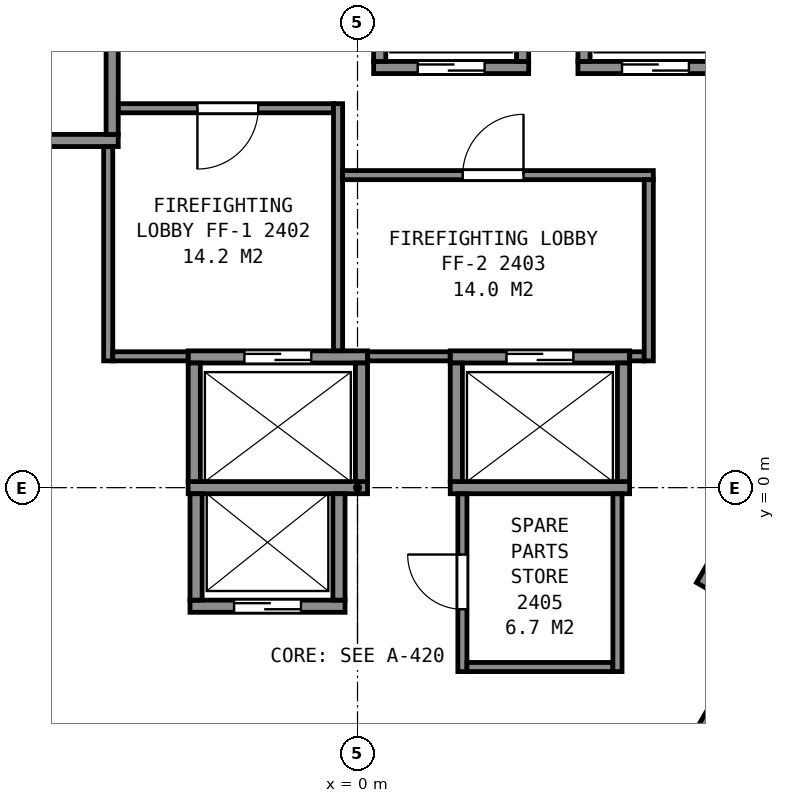
"""IFC4 building model, lengths in metres.
Left out: names, types, materials, properties, quantities, classifications, styles, units other than length and angle.
Written with IfcOpenShell. Run it as: python <this file> out.ifc"""

import sys

from ifc_helpers import new_model, si_unit, direction, frame, frame_2d, origin, place, context, subcontext, project, spatial, rectangle, extrude, element, fill, save


model = new_model("IFC4")
c1 = context("Model", 3, precision=1e-05, world=origin(), true_north=direction((0.0, 1.0)))
c2 = subcontext(c1, "Body", "Model", "MODEL_VIEW")
j1 = project(units=[si_unit("LENGTHUNIT", "METRE"), si_unit("PLANEANGLEUNIT", "RADIAN")], contexts=[c1])
p1 = place(None, origin())
s1 = spatial("IfcSite", under=j1, at=p1, CompositionType="ELEMENT")
p2 = place(p1, origin())
s2 = spatial("IfcBuilding", under=s1, at=p2, CompositionType="ELEMENT")
p3 = place(p2, frame((0.0, 0.0, 103.6)))
s3 = spatial("IfcBuildingStorey", under=s2, at=p3, CompositionType="ELEMENT", Elevation=103.6)
p4 = place(p3, frame((-2.755, -1.95, 0.0), z_axis=(0.0, 0.0, 1.0), x_axis=(1.0, 0.0, 0.0)))
e1 = element("IfcWall", 1, at=p4, inside=s3, PredefinedType="PARTITIONING", context=c2, shape_type="SweptSolid", body=[
    extrude(rectangle(XDim=2.55, YDim=0.2, at=frame_2d((1.275, 0.0))), origin(), (0.0, 0.0, 1.0), 3.6),
])
p5 = place(p4, frame((0.725, 0.0, 0.0)))
e2 = element("IfcOpeningElement", 2, at=p5, cuts=e1, PredefinedType="OPENING", context=c2, shape_type="SweptSolid", body=[
    extrude(rectangle(XDim=1.1, YDim=2.1, at=frame_2d((0.55, 1.05))), frame((0.0, 0.11, 0.0), z_axis=(0.0, -1.0, 0.0), x_axis=(1.0, 0.0, 0.0)), (0.0, 0.0, 1.0), 0.22),
])
p6 = place(p3, frame((-2.785, 0.0, 0.0), z_axis=(0.0, 0.0, 1.0), x_axis=(1.0, 0.0, 0.0)))
e3 = element("IfcWall", 3, at=p6, inside=s3, PredefinedType="PARTITIONING", context=c2, shape_type="SweptSolid", body=[
    extrude(rectangle(XDim=2.95, YDim=0.2, at=frame_2d((1.475, 0.0))), origin(), (0.0, 0.0, 1.0), 3.6),
])
p7 = place(p3, frame((1.525, 0.0, 0.0), z_axis=(0.0, 0.0, 1.0), x_axis=(1.0, 0.0, 0.0)))
e4 = element("IfcWall", 4, at=p7, inside=s3, PredefinedType="PARTITIONING", context=c2, shape_type="SweptSolid", body=[
    extrude(rectangle(XDim=2.95, YDim=0.2, at=frame_2d((1.475, 0.0))), origin(), (0.0, 0.0, 1.0), 3.6),
])
p8 = place(p3, frame((-2.785, 2.15, 0.0), z_axis=(0.0, 0.0, 1.0), x_axis=(1.0, 0.0, 0.0)))
e5 = element("IfcWall", 5, at=p8, inside=s3, PredefinedType="PARTITIONING", context=c2, shape_type="SweptSolid", body=[
    extrude(rectangle(XDim=2.95, YDim=0.2, at=frame_2d((1.475, 0.0))), origin(), (0.0, 0.0, 1.0), 3.6),
])
p9 = place(p8, frame((0.925, 0.0, 0.0)))
e6 = element("IfcOpeningElement", 6, at=p9, cuts=e5, PredefinedType="OPENING", context=c2, shape_type="SweptSolid", body=[
    extrude(rectangle(XDim=1.1, YDim=2.1, at=frame_2d((0.55, 1.05))), frame((0.0, 0.11, 0.0), z_axis=(0.0, -1.0, 0.0), x_axis=(1.0, 0.0, 0.0)), (0.0, 0.0, 1.0), 0.22),
])
p10 = place(p3, frame((1.525, 2.15, 0.0), z_axis=(0.0, 0.0, 1.0), x_axis=(1.0, 0.0, 0.0)))
e7 = element("IfcWall", 7, at=p10, inside=s3, PredefinedType="PARTITIONING", context=c2, shape_type="SweptSolid", body=[
    extrude(rectangle(XDim=2.95, YDim=0.2, at=frame_2d((1.475, 0.0))), origin(), (0.0, 0.0, 1.0), 3.6),
])
p11 = place(p10, frame((0.925, 0.0, 0.0)))
e8 = element("IfcOpeningElement", 8, at=p11, cuts=e7, PredefinedType="OPENING", context=c2, shape_type="SweptSolid", body=[
    extrude(rectangle(XDim=1.1, YDim=2.1, at=frame_2d((0.55, 1.05))), frame((0.0, 0.11, 0.0), z_axis=(0.0, -1.0, 0.0), x_axis=(1.0, 0.0, 0.0)), (0.0, 0.0, 1.0), 0.22),
])
p12 = place(p3, frame((-6.285, 5.71, 0.0), z_axis=(0.0, 0.0, 1.0), x_axis=(1.0, 0.0, 0.0)))
e9 = element("IfcWall", 9, at=p12, inside=s3, PredefinedType="PARTITIONING", context=c2, shape_type="SweptSolid", body=[
    extrude(rectangle(XDim=2.35, YDim=0.2, at=frame_2d((1.175, 0.0))), origin(), (0.0, 0.0, 1.0), 3.6),
])
p13 = place(p3, frame((0.265, 6.91, 0.0), z_axis=(0.0, 0.0, 1.0), x_axis=(1.0, 0.0, 0.0)))
e10 = element("IfcWall", 10, at=p13, inside=s3, PredefinedType="PARTITIONING", context=c2, shape_type="SweptSolid", body=[
    extrude(rectangle(XDim=2.55, YDim=0.2, at=frame_2d((1.275, 0.0))), origin(), (0.0, 0.0, 1.0), 3.6),
])
p14 = place(p13, frame((0.725, 0.0, 0.0)))
e11 = element("IfcOpeningElement", 11, at=p14, cuts=e10, PredefinedType="OPENING", context=c2, shape_type="SweptSolid", body=[
    extrude(rectangle(XDim=1.1, YDim=2.1, at=frame_2d((0.55, 1.05))), frame((0.0, 0.11, 0.0), z_axis=(0.0, -1.0, 0.0), x_axis=(1.0, 0.0, 0.0)), (0.0, 0.0, 1.0), 0.22),
])
p15 = place(p3, frame((3.625, 6.91, 0.0), z_axis=(0.0, 0.0, 1.0), x_axis=(1.0, 0.0, 0.0)))
e12 = element("IfcWall", 12, at=p15, inside=s3, PredefinedType="PARTITIONING", context=c2, shape_type="SweptSolid", body=[
    extrude(rectangle(XDim=2.55, YDim=0.2, at=frame_2d((1.275, 0.0))), origin(), (0.0, 0.0, 1.0), 3.6),
])
p16 = place(p15, frame((0.725, 0.0, 0.0)))
e13 = element("IfcOpeningElement", 13, at=p16, cuts=e12, PredefinedType="OPENING", context=c2, shape_type="SweptSolid", body=[
    extrude(rectangle(XDim=1.1, YDim=2.1, at=frame_2d((0.55, 1.05))), frame((0.0, 0.11, 0.0), z_axis=(0.0, -1.0, 0.0), x_axis=(1.0, 0.0, 0.0)), (0.0, 0.0, 1.0), 0.22),
])
p17 = place(p3, frame((5.527, -4.247, 0.0), z_axis=(0.0, 0.0, 1.0), x_axis=(0.499938297808, 0.866061024631, 0.0)))
e14 = element("IfcWall", 14, at=p17, inside=s3, PredefinedType="PARTITIONING", context=c2, shape_type="SweptSolid", body=[
    extrude(rectangle(XDim=2.35, YDim=0.2, at=frame_2d((1.175, 0.0))), origin(), (0.0, 0.0, 1.0), 3.6),
])
p18 = place(p17, frame((0.725, 0.0, 0.0)))
e15 = element("IfcOpeningElement", 15, at=p18, cuts=e14, PredefinedType="OPENING", context=c2, shape_type="SweptSolid", body=[
    extrude(rectangle(XDim=1.1, YDim=2.1, at=frame_2d((0.55, 1.05))), frame((0.0, 0.11, 0.0), z_axis=(0.0, -1.0, 0.0), x_axis=(1.0, 0.0, 0.0)), (0.0, 0.0, 1.0), 0.22),
])
p19 = place(p3, frame((5.663, -1.612, 0.0), z_axis=(0.0, 0.0, 1.0), x_axis=(0.49998122708, 0.866036242063, 0.0)))
e16 = element("IfcWall", 16, at=p19, inside=s3, PredefinedType="PARTITIONING", context=c2, shape_type="SweptSolid", body=[
    extrude(rectangle(XDim=4.9, YDim=0.2, at=frame_2d((2.45, 0.0))), origin(), (0.0, 0.0, 1.0), 3.6),
])
p20 = place(p3, frame((4.375, 0.1, 0.0), z_axis=(0.0, 0.0, 1.0), x_axis=(0.0, 1.0, 0.0)))
e17 = element("IfcWall", 17, at=p20, inside=s3, PredefinedType="PARTITIONING", context=c2, shape_type="SweptSolid", body=[
    extrude(rectangle(XDim=1.95, YDim=0.2, at=frame_2d((0.975, 0.0))), origin(), (0.0, 0.0, 1.0), 3.6),
])
for number, where, z_axis, x_axis in (
    (18, (3.725, 7.01, 0.0), (0.0, 0.0, 1.0), (0.0, 1.0, 0.0)),
    (19, (2.715, 7.01, 0.0), (0.0, 0.0, 1.0), (0.0, 1.0, 0.0)),
):
    element("IfcWall", number, at=place(p3, frame(where, z_axis=z_axis, x_axis=x_axis)), inside=s3, PredefinedType="PARTITIONING", context=c2, shape_type="SweptSolid", body=[
        extrude(rectangle(XDim=1.75, YDim=0.2, at=frame_2d((0.875, 0.0))), origin(), (0.0, 0.0, 1.0), 3.6),
    ])
p21 = place(p3, frame((1.625, 0.1, 0.0), z_axis=(0.0, 0.0, 1.0), x_axis=(0.0, 1.0, 0.0)))
e20 = element("IfcWall", 20, at=p21, inside=s3, PredefinedType="PARTITIONING", context=c2, shape_type="SweptSolid", body=[
    extrude(rectangle(XDim=1.95, YDim=0.2, at=frame_2d((0.975, 0.0))), origin(), (0.0, 0.0, 1.0), 3.6),
])
p22 = place(p3, frame((0.365, 7.01, 0.0), z_axis=(0.0, 0.0, 1.0), x_axis=(0.0, 1.0, 0.0)))
e21 = element("IfcWall", 21, at=p22, inside=s3, PredefinedType="PARTITIONING", context=c2, shape_type="SweptSolid", body=[
    extrude(rectangle(XDim=1.75, YDim=0.2, at=frame_2d((0.875, 0.0))), origin(), (0.0, 0.0, 1.0), 3.6),
])
p23 = place(p3, frame((0.065, 0.1, 0.0), z_axis=(0.0, 0.0, 1.0), x_axis=(0.0, 1.0, 0.0)))
e22 = element("IfcWall", 22, at=p23, inside=s3, PredefinedType="PARTITIONING", context=c2, shape_type="SweptSolid", body=[
    extrude(rectangle(XDim=1.95, YDim=0.2, at=frame_2d((0.975, 0.0))), origin(), (0.0, 0.0, 1.0), 3.6),
])
for number, where, z_axis, x_axis in (
    (23, (-0.305, -1.85, 0.0), (0.0, 0.0, 1.0), (0.0, 1.0, 0.0)),
    (24, (-2.655, -1.85, 0.0), (0.0, 0.0, 1.0), (0.0, 1.0, 0.0)),
):
    element("IfcWall", number, at=place(p3, frame(where, z_axis=z_axis, x_axis=x_axis)), inside=s3, PredefinedType="PARTITIONING", context=c2, shape_type="SweptSolid", body=[
        extrude(rectangle(XDim=1.75, YDim=0.2, at=frame_2d((0.875, 0.0))), origin(), (0.0, 0.0, 1.0), 3.6),
    ])
p24 = place(p3, frame((-2.685, 0.1, 0.0), z_axis=(0.0, 0.0, 1.0), x_axis=(0.0, 1.0, 0.0)))
e25 = element("IfcWall", 25, at=p24, inside=s3, PredefinedType="PARTITIONING", context=c2, shape_type="SweptSolid", body=[
    extrude(rectangle(XDim=1.95, YDim=0.2, at=frame_2d((0.975, 0.0))), origin(), (0.0, 0.0, 1.0), 3.6),
])
p25 = place(p3, frame((-4.035, 5.81, 0.0), z_axis=(0.0, 0.0, 1.0), x_axis=(0.0, 1.0, 0.0)))
e26 = element("IfcWall", 26, at=p25, inside=s3, PredefinedType="PARTITIONING", context=c2, shape_type="SweptSolid", body=[
    extrude(rectangle(XDim=1.75, YDim=0.2, at=frame_2d((0.875, 0.0))), origin(), (0.0, 0.0, 1.0), 3.6),
])
p26 = place(p3, frame((-13.664, 5.946, 0.0), z_axis=(0.0, 0.0, 1.0), x_axis=(0.499994327219, -0.866028678941, 0.0)))
e27 = element("IfcWall", 27, at=p26, inside=s3, PredefinedType="PARTITIONING", context=c2, shape_type="SweptSolid", body=[
    extrude(rectangle(XDim=23.968, YDim=0.2, at=frame_2d((11.984, 0.0))), origin(), (0.0, 0.0, 1.0), 3.35),
])
p27 = place(p3, frame((-4.152, -5.729, 0.0), z_axis=(0.0, 0.0, 1.0), x_axis=(-0.500024287448, 0.866011380966, 0.0)))
e28 = element("IfcWall", 28, at=p27, inside=s3, PredefinedType="PARTITIONING", context=c2, shape_type="SweptSolid", body=[
    extrude(rectangle(XDim=3.501, YDim=0.15, at=frame_2d((1.75, 0.0))), origin(), (0.0, 0.0, 1.0), 3.35),
])
p28 = place(p27, frame((2.026, 0.0, 0.0)))
e29 = element("IfcOpeningElement", 29, at=p28, cuts=e28, PredefinedType="OPENING", context=c2, shape_type="SweptSolid", body=[
    extrude(rectangle(XDim=0.9, YDim=2.1, at=frame_2d((0.45, 1.05))), frame((0.0, 0.085, 0.0), z_axis=(0.0, -1.0, 0.0), x_axis=(1.0, 0.0, 0.0)), (0.0, 0.0, 1.0), 0.17),
])
p29 = place(p27, frame((0.248, 0.0, 0.0)))
e30 = element("IfcOpeningElement", 30, at=p29, cuts=e28, PredefinedType="OPENING", context=c2, shape_type="SweptSolid", body=[
    extrude(rectangle(XDim=0.9, YDim=2.1, at=frame_2d((0.45, 1.05))), frame((0.0, 0.085, 0.0), z_axis=(0.0, -1.0, 0.0), x_axis=(1.0, 0.0, 0.0)), (0.0, 0.0, 1.0), 0.17),
])
p30 = place(p3, frame((-4.1, 2.085, 0.0), z_axis=(0.0, 0.0, 1.0), x_axis=(0.0, 1.0, 0.0)))
e31 = element("IfcWall", 31, at=p30, inside=s3, PredefinedType="PARTITIONING", context=c2, shape_type="SweptSolid", body=[
    extrude(rectangle(XDim=3.523, YDim=0.15, at=frame_2d((1.761, 0.0))), origin(), (0.0, 0.0, 1.0), 3.35),
])
p31 = place(p3, frame((-4.025, 2.16, 0.0), z_axis=(0.0, 0.0, 1.0), x_axis=(1.0, 0.0, 0.0)))
e32 = element("IfcWall", 32, at=p31, inside=s3, PredefinedType="PARTITIONING", context=c2, shape_type="SweptSolid", body=[
    extrude(rectangle(XDim=1.238, YDim=0.15, at=frame_2d((0.619, 0.0))), origin(), (0.0, 0.0, 1.0), 3.35),
])
p32 = place(p3, frame((-3.933, 6.24, 0.0), z_axis=(0.0, 0.0, 1.0), x_axis=(1.0, 0.0, 0.0)))
e33 = element("IfcWall", 33, at=p32, inside=s3, PredefinedType="PARTITIONING", context=c2, shape_type="SweptSolid", body=[
    extrude(rectangle(XDim=3.538, YDim=0.15, at=frame_2d((1.769, 0.0))), origin(), (0.0, 0.0, 1.0), 3.35),
])
p33 = place(p32, frame((1.3, 0.0, 0.0)))
e34 = element("IfcOpeningElement", 34, at=p33, cuts=e33, PredefinedType="OPENING", context=c2, shape_type="SweptSolid", body=[
    extrude(rectangle(XDim=1.0, YDim=2.1, at=frame_2d((0.5, 1.05))), frame((0.0, 0.085, 0.0), z_axis=(0.0, -1.0, 0.0), x_axis=(1.0, 0.0, 0.0)), (0.0, 0.0, 1.0), 0.17),
])
p34 = place(p3, frame((-0.32, 2.252, 0.0), z_axis=(0.0, 0.0, 1.0), x_axis=(0.0, 1.0, 0.0)))
e35 = element("IfcWall", 35, at=p34, inside=s3, PredefinedType="PARTITIONING", context=c2, shape_type="SweptSolid", body=[
    extrude(rectangle(XDim=4.063, YDim=0.15, at=frame_2d((2.031, 0.0))), origin(), (0.0, 0.0, 1.0), 3.35),
])
p35 = place(p3, frame((-0.245, 5.14, 0.0), z_axis=(0.0, 0.0, 1.0), x_axis=(1.0, 0.0, 0.0)))
e36 = element("IfcWall", 36, at=p35, inside=s3, PredefinedType="PARTITIONING", context=c2, shape_type="SweptSolid", body=[
    extrude(rectangle(XDim=5.11, YDim=0.15, at=frame_2d((2.555, 0.0))), origin(), (0.0, 0.0, 1.0), 3.35),
])
p36 = place(p35, frame((1.975, 0.0, 0.0)))
e37 = element("IfcOpeningElement", 37, at=p36, cuts=e36, PredefinedType="OPENING", context=c2, shape_type="SweptSolid", body=[
    extrude(rectangle(XDim=1.0, YDim=2.1, at=frame_2d((0.5, 1.05))), frame((0.0, 0.085, 0.0), z_axis=(0.0, -1.0, 0.0), x_axis=(1.0, 0.0, 0.0)), (0.0, 0.0, 1.0), 0.17),
])
p37 = place(p3, frame((0.167, 2.16, 0.0), z_axis=(0.0, 0.0, 1.0), x_axis=(1.0, 0.0, 0.0)))
e38 = element("IfcWall", 38, at=p37, inside=s3, PredefinedType="PARTITIONING", context=c2, shape_type="SweptSolid", body=[
    extrude(rectangle(XDim=1.356, YDim=0.15, at=frame_2d((0.678, 0.0))), origin(), (0.0, 0.0, 1.0), 3.35),
])
p38 = place(p3, frame((1.725, -0.102, 0.0), z_axis=(0.0, 0.0, 1.0), x_axis=(0.0, -1.0, 0.0)))
e39 = element("IfcWall", 39, at=p38, inside=s3, PredefinedType="PARTITIONING", context=c2, shape_type="SweptSolid", body=[
    extrude(rectangle(XDim=2.923, YDim=0.15, at=frame_2d((1.461, 0.0))), origin(), (0.0, 0.0, 1.0), 3.35),
])
p39 = place(p38, frame((0.998, 0.0, 0.0)))
e40 = element("IfcOpeningElement", 40, at=p39, cuts=e39, PredefinedType="OPENING", context=c2, shape_type="SweptSolid", body=[
    extrude(rectangle(XDim=0.9, YDim=2.1, at=frame_2d((0.45, 1.05))), frame((0.0, 0.085, 0.0), z_axis=(0.0, -1.0, 0.0), x_axis=(1.0, 0.0, 0.0)), (0.0, 0.0, 1.0), 0.17),
])
p40 = place(p3, frame((1.8, -2.95, 0.0), z_axis=(0.0, 0.0, 1.0), x_axis=(1.0, 0.0, 0.0)))
e41 = element("IfcWall", 41, at=p40, inside=s3, PredefinedType="PARTITIONING", context=c2, shape_type="SweptSolid", body=[
    extrude(rectangle(XDim=2.4, YDim=0.15, at=frame_2d((1.2, 0.0))), origin(), (0.0, 0.0, 1.0), 3.35),
])
p41 = place(p3, frame((4.275, -3.025, 0.0), z_axis=(0.0, 0.0, 1.0), x_axis=(0.0, 1.0, 0.0)))
e42 = element("IfcWall", 42, at=p41, inside=s3, PredefinedType="PARTITIONING", context=c2, shape_type="SweptSolid", body=[
    extrude(rectangle(XDim=2.923, YDim=0.15, at=frame_2d((1.461, 0.0))), origin(), (0.0, 0.0, 1.0), 3.35),
])
p42 = place(p3, frame((4.477, 2.16, 0.0), z_axis=(0.0, 0.0, 1.0), x_axis=(1.0, 0.0, 0.0)))
e43 = element("IfcWall", 43, at=p42, inside=s3, PredefinedType="PARTITIONING", context=c2, shape_type="SweptSolid", body=[
    extrude(rectangle(XDim=0.238, YDim=0.15, at=frame_2d((0.119, 0.0))), origin(), (0.0, 0.0, 1.0), 3.35),
])
p43 = place(p3, frame((4.79, 2.085, 0.0), z_axis=(0.0, 0.0, 1.0), x_axis=(0.0, 1.0, 0.0)))
e44 = element("IfcWall", 44, at=p43, inside=s3, PredefinedType="PARTITIONING", context=c2, shape_type="SweptSolid", body=[
    extrude(rectangle(XDim=2.98, YDim=0.15, at=frame_2d((1.49, 0.0))), origin(), (0.0, 0.0, 1.0), 3.35),
])
p44 = place(p3, frame((-3.756, -15.494, 0.0), z_axis=(0.0, 0.0, 1.0), x_axis=(-0.500027787016, 0.866009360349, 0.0)))
e45 = element("IfcWall", 45, at=p44, inside=s3, PredefinedType="PARTITIONING", context=c2, shape_type="SweptSolid", body=[
    extrude(rectangle(XDim=23.856, YDim=0.125, at=frame_2d((11.928, 0.0))), origin(), (0.0, 0.0, 1.0), 2.613),
])
p45 = place(p44, frame((15.368, 0.0, 0.0)))
e46 = element("IfcOpeningElement", 46, at=p45, cuts=e45, PredefinedType="OPENING", context=c2, shape_type="SweptSolid", body=[
    extrude(rectangle(XDim=1.0, YDim=2.1, at=frame_2d((0.5, 1.05))), frame((0.0, 0.073, 0.0), z_axis=(0.0, -1.0, 0.0), x_axis=(1.0, 0.0, 0.0)), (0.0, 0.0, 1.0), 0.145),
])
p46 = place(p44, frame((10.54, 0.0, 0.0)))
e47 = element("IfcOpeningElement", 47, at=p46, cuts=e45, PredefinedType="OPENING", context=c2, shape_type="SweptSolid", body=[
    extrude(rectangle(XDim=1.0, YDim=2.1, at=frame_2d((0.5, 1.05))), frame((0.0, 0.073, 0.0), z_axis=(0.0, -1.0, 0.0), x_axis=(1.0, 0.0, 0.0)), (0.0, 0.0, 1.0), 0.145),
])
p47 = place(p3, frame((15.684, 5.165, 0.0), z_axis=(0.0, 0.0, 1.0), x_axis=(-0.500027787016, -0.866009360349, 0.0)))
e48 = element("IfcWall", 48, at=p47, inside=s3, PredefinedType="PARTITIONING", context=c2, shape_type="SweptSolid", body=[
    extrude(rectangle(XDim=23.856, YDim=0.125, at=frame_2d((11.928, 0.0))), origin(), (0.0, 0.0, 1.0), 2.613),
])
p48 = place(p47, frame((16.996, 0.0, 0.0)))
e49 = element("IfcOpeningElement", 49, at=p48, cuts=e48, PredefinedType="OPENING", context=c2, shape_type="SweptSolid", body=[
    extrude(rectangle(XDim=1.0, YDim=2.1, at=frame_2d((0.5, 1.05))), frame((0.0, 0.073, 0.0), z_axis=(0.0, -1.0, 0.0), x_axis=(1.0, 0.0, 0.0)), (0.0, 0.0, 1.0), 0.145),
])
p49 = place(p47, frame((12.28, 0.0, 0.0)))
e50 = element("IfcOpeningElement", 50, at=p49, cuts=e48, PredefinedType="OPENING", context=c2, shape_type="SweptSolid", body=[
    extrude(rectangle(XDim=1.0, YDim=2.1, at=frame_2d((0.5, 1.05))), frame((0.0, 0.073, 0.0), z_axis=(0.0, -1.0, 0.0), x_axis=(1.0, 0.0, 0.0)), (0.0, 0.0, 1.0), 0.145),
])
p50 = place(p14, origin())
e51 = element("IfcDoor", 51, at=p50, inside=s3, OperationType="SLIDING_TO_LEFT", PredefinedType="DOOR", context=c2, shape_type="SweptSolid", body=[
    extrude(rectangle(XDim=1.1, YDim=2.1, at=frame_2d((0.55, 1.05))), frame((0.0, 0.025, 0.0), z_axis=(0.0, -1.0, 0.0), x_axis=(1.0, 0.0, 0.0)), (0.0, 0.0, 1.0), 0.05),
])
fill(e11, e51)
p51 = place(p5, origin())
e52 = element("IfcDoor", 52, at=p51, inside=s3, OperationType="SLIDING_TO_RIGHT", PredefinedType="DOOR", context=c2, shape_type="SweptSolid", body=[
    extrude(rectangle(XDim=1.1, YDim=2.1, at=frame_2d((0.55, 1.05))), frame((0.0, 0.025, 0.0), z_axis=(0.0, -1.0, 0.0), x_axis=(1.0, 0.0, 0.0)), (0.0, 0.0, 1.0), 0.05),
])
fill(e2, e52)
p52 = place(p16, origin())
e53 = element("IfcDoor", 53, at=p52, inside=s3, OperationType="SLIDING_TO_LEFT", PredefinedType="DOOR", context=c2, shape_type="SweptSolid", body=[
    extrude(rectangle(XDim=1.1, YDim=2.1, at=frame_2d((0.55, 1.05))), frame((0.0, 0.025, 0.0), z_axis=(0.0, -1.0, 0.0), x_axis=(1.0, 0.0, 0.0)), (0.0, 0.0, 1.0), 0.05),
])
fill(e13, e53)
p53 = place(p9, origin())
e54 = element("IfcDoor", 54, at=p53, inside=s3, OperationType="SLIDING_TO_LEFT", PredefinedType="DOOR", context=c2, shape_type="SweptSolid", body=[
    extrude(rectangle(XDim=1.1, YDim=2.1, at=frame_2d((0.55, 1.05))), frame((0.0, 0.025, 0.0), z_axis=(0.0, -1.0, 0.0), x_axis=(1.0, 0.0, 0.0)), (0.0, 0.0, 1.0), 0.05),
])
fill(e6, e54)
p54 = place(p11, origin())
e55 = element("IfcDoor", 55, at=p54, inside=s3, OperationType="SLIDING_TO_RIGHT", PredefinedType="DOOR", context=c2, shape_type="SweptSolid", body=[
    extrude(rectangle(XDim=1.1, YDim=2.1, at=frame_2d((0.55, 1.05))), frame((0.0, 0.025, 0.0), z_axis=(0.0, -1.0, 0.0), x_axis=(1.0, 0.0, 0.0)), (0.0, 0.0, 1.0), 0.05),
])
fill(e8, e55)
p55 = place(p33, origin())
e56 = element("IfcDoor", 56, at=p55, inside=s3, OperationType="SINGLE_SWING_LEFT", PredefinedType="DOOR", context=c2, shape_type="SweptSolid", body=[
    extrude(rectangle(XDim=1.0, YDim=2.1, at=frame_2d((0.5, 1.05))), frame((0.0, 0.025, 0.0), z_axis=(0.0, -1.0, 0.0), x_axis=(1.0, 0.0, 0.0)), (0.0, 0.0, 1.0), 0.05),
])
fill(e34, e56)
p56 = place(p36, origin())
e57 = element("IfcDoor", 57, at=p56, inside=s3, OperationType="SINGLE_SWING_RIGHT", PredefinedType="DOOR", context=c2, shape_type="SweptSolid", body=[
    extrude(rectangle(XDim=1.0, YDim=2.1, at=frame_2d((0.5, 1.05))), frame((0.0, 0.025, 0.0), z_axis=(0.0, -1.0, 0.0), x_axis=(1.0, 0.0, 0.0)), (0.0, 0.0, 1.0), 0.05),
])
fill(e37, e57)
p57 = place(p39, origin())
e58 = element("IfcDoor", 58, at=p57, inside=s3, OperationType="SINGLE_SWING_LEFT", PredefinedType="DOOR", context=c2, shape_type="SweptSolid", body=[
    extrude(rectangle(XDim=0.9, YDim=2.1, at=frame_2d((0.45, 1.05))), frame((0.0, 0.025, 0.0), z_axis=(0.0, -1.0, 0.0), x_axis=(1.0, 0.0, 0.0)), (0.0, 0.0, 1.0), 0.05),
])
fill(e40, e58)
save(model, sys.argv[1])
